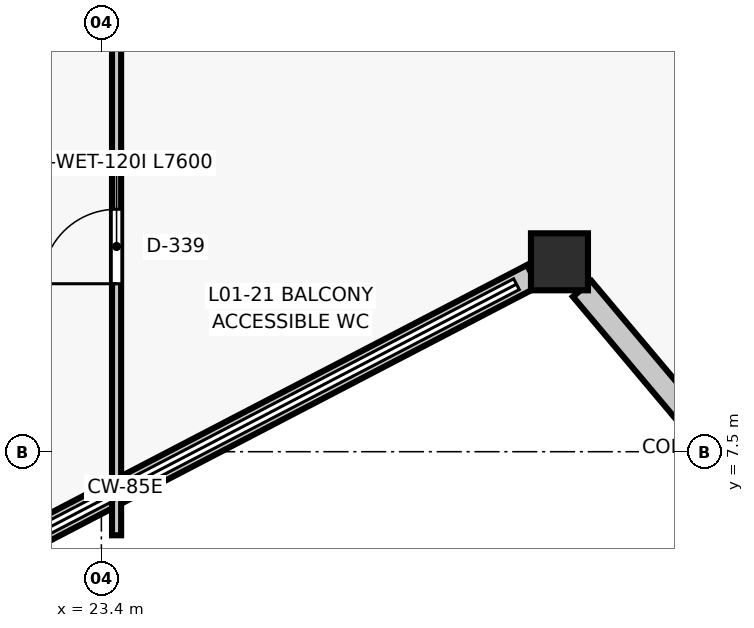
"""IFC4 building model, lengths in metres.
Left out: names, types, materials, properties, quantities, classifications, styles, units other than length and angle.
Written with IfcOpenShell. Run it as: python <this file> out.ifc"""

import sys

from ifc_helpers import new_model, si_unit, direction, frame, frame_2d, origin, origin_2d, place, context, subcontext, project, spatial, rectangle, extrude, element, fill, save


model = new_model("IFC4")
c1 = context("Model", 3, precision=1e-05, world=origin(), true_north=direction((0.0, 1.0)))
c2 = subcontext(c1, "Body", "Model", "MODEL_VIEW")
j1 = project(units=[si_unit("LENGTHUNIT", "METRE"), si_unit("PLANEANGLEUNIT", "RADIAN")], contexts=[c1])
p1 = place(None, origin())
s1 = spatial("IfcSite", under=j1, at=p1, CompositionType="ELEMENT")
p2 = place(p1, origin())
s2 = spatial("IfcBuilding", under=s1, at=p2, CompositionType="ELEMENT")
p3 = place(p2, frame((0.0, 0.0, 4.5)))
s3 = spatial("IfcBuildingStorey", under=s2, at=p3, CompositionType="ELEMENT", Elevation=4.5)
p4 = place(p3, frame((29.427, 9.999, 0.0), z_axis=(0.0, 0.0, 1.0), x_axis=(1.0, 0.0, 0.0)))
e1 = element("IfcColumn", 1, at=p4, inside=s3, PredefinedType="COLUMN", context=c2, shape_type="SweptSolid", body=[
    extrude(rectangle(XDim=0.75, YDim=0.75, at=origin_2d()), origin(), (0.0, 0.0, 1.0), 4.2),
])
p5 = place(p3, frame((31.666, 7.337, 0.0), z_axis=(0.0, 0.0, 1.0), x_axis=(-0.643796278673, 0.765196936459, 0.0)))
e2 = element("IfcWall", 2, at=p5, inside=s3, PredefinedType="STANDARD", context=c2, shape_type="SweptSolid", body=[
    extrude(rectangle(XDim=3.012, YDim=0.32, at=frame_2d((1.506, 0.0))), origin(), (0.0, 0.0, 1.0), 3.285),
])
p6 = place(p3, frame((29.074, 9.815, 0.0), z_axis=(0.0, 0.0, 1.0), x_axis=(-0.887012674584, -0.46174507591, 0.0)))
e3 = element("IfcWall", 3, at=p6, inside=s3, PredefinedType="STANDARD", context=c2, shape_type="SweptSolid", body=[
    extrude(rectangle(XDim=12.087, YDim=0.32, at=frame_2d((6.044, 0.0))), origin(), (0.0, 0.0, 1.0), 0.8),
])
p7 = place(p3, frame((23.6, 6.4, 0.0), z_axis=(0.0, 0.0, 1.0), x_axis=(0.0, 1.0, 0.0)))
e4 = element("IfcWall", 4, at=p7, inside=s3, PredefinedType="PARTITIONING", context=c2, shape_type="SweptSolid", body=[
    extrude(rectangle(XDim=7.6, YDim=0.12, at=frame_2d((3.8, 0.0))), origin(), (0.0, 0.0, 1.0), 11.765),
])
p8 = place(p7, frame((3.31, 0.0, 0.0)))
e5 = element("IfcOpeningElement", 5, at=p8, cuts=e4, PredefinedType="OPENING", context=c2, shape_type="SweptSolid", body=[
    extrude(rectangle(XDim=0.98, YDim=2.1, at=frame_2d((0.49, 1.05))), frame((0.0, 0.07, 0.0), z_axis=(0.0, -1.0, 0.0), x_axis=(1.0, 0.0, 0.0)), (0.0, 0.0, 1.0), 0.14),
])
p9 = place(p8, origin())
e6 = element("IfcDoor", 6, at=p9, inside=s3, OperationType="SINGLE_SWING_LEFT", PredefinedType="DOOR", context=c2, shape_type="SweptSolid", body=[
    extrude(rectangle(XDim=0.98, YDim=2.1, at=frame_2d((0.49, 1.05))), frame((0.0, 0.025, 0.0), z_axis=(0.0, -1.0, 0.0), x_axis=(1.0, 0.0, 0.0)), (0.0, 0.0, 1.0), 0.05),
])
fill(e5, e6)
save(model, sys.argv[1])
